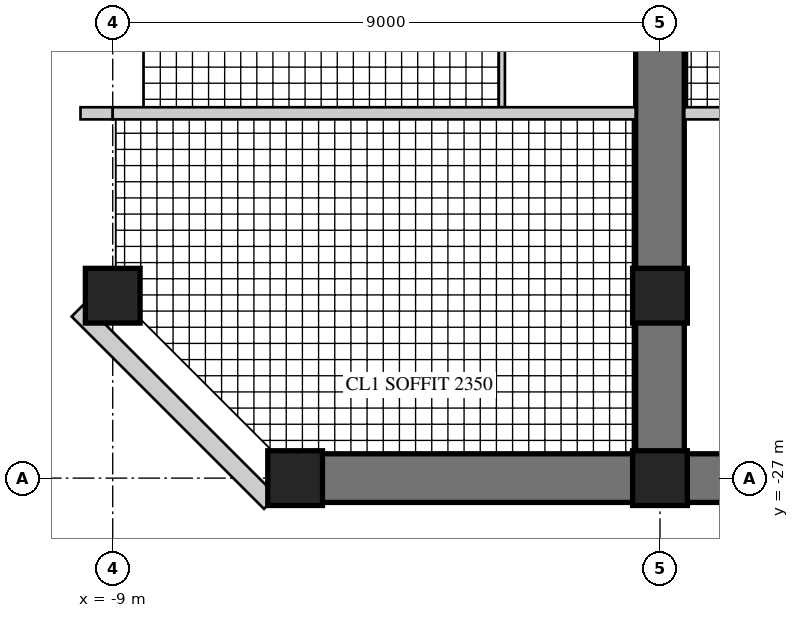
"""IFC4 building model, lengths in metres.
Left out: names, types, materials, properties, quantities, classifications, styles, units other than length and angle.
Written with IfcOpenShell. Run it as: python <this file> out.ifc"""

import sys

from ifc_helpers import new_model, si_unit, direction, frame, frame_2d, origin, origin_2d, place, context, subcontext, project, spatial, rectangle, hollow_rectangle, extrude, element, fill, save


model = new_model("IFC4")
c1 = context("Model", 3, precision=1e-05, world=origin(), true_north=direction((0.0, 1.0)))
c2 = subcontext(c1, "Body", "Model", "MODEL_VIEW")
j1 = project(units=[si_unit("LENGTHUNIT", "METRE"), si_unit("PLANEANGLEUNIT", "RADIAN")], contexts=[c1])
p1 = place(None, origin())
s1 = spatial("IfcSite", under=j1, at=p1, CompositionType="ELEMENT")
p2 = place(p1, origin())
s2 = spatial("IfcBuilding", under=s1, at=p2, CompositionType="ELEMENT")
p3 = place(p2, frame((0.0, 0.0, 172.9)))
s3 = spatial("IfcBuildingStorey", under=s2, at=p3, CompositionType="ELEMENT", Elevation=172.9)
p4 = place(p3, frame((0.0, -9.0, 0.0), z_axis=(0.0, 0.0, 1.0), x_axis=(0.0, -1.0, 0.0)))
e1 = element("IfcWall", 1, at=p4, inside=s3, PredefinedType="SHEAR", context=c2, shape_type="SweptSolid", body=[
    extrude(rectangle(XDim=18.0, YDim=0.8, at=frame_2d((9.0, 0.0))), origin(), (0.0, 0.0, 1.0), 3.4),
])
p5 = place(p4, frame((3.95, 0.0, 0.0)))
e2 = element("IfcOpeningElement", 2, at=p5, cuts=e1, PredefinedType="OPENING", context=c2, shape_type="SweptSolid", body=[
    extrude(rectangle(XDim=1.0, YDim=2.15, at=frame_2d((0.5, 1.075))), frame((0.0, 0.41, 0.0), z_axis=(0.0, -1.0, 0.0), x_axis=(1.0, 0.0, 0.0)), (0.0, 0.0, 1.0), 0.82),
])
p6 = place(p4, frame((6.6, 0.0, 0.0)))
e3 = element("IfcOpeningElement", 3, at=p6, cuts=e1, PredefinedType="OPENING", context=c2, shape_type="SweptSolid", body=[
    extrude(rectangle(XDim=1.0, YDim=2.15, at=frame_2d((0.5, 1.075))), frame((0.0, 0.41, 0.0), z_axis=(0.0, -1.0, 0.0), x_axis=(1.0, 0.0, 0.0)), (0.0, 0.0, 1.0), 0.82),
])
p7 = place(p4, frame((13.25, 0.0, 0.0)))
e4 = element("IfcOpeningElement", 4, at=p7, cuts=e1, PredefinedType="OPENING", context=c2, shape_type="SweptSolid", body=[
    extrude(rectangle(XDim=1.0, YDim=2.2, at=frame_2d((0.5, 1.1))), frame((0.0, 0.41, 0.0), z_axis=(0.0, -1.0, 0.0), x_axis=(1.0, 0.0, 0.0)), (0.0, 0.0, 1.0), 0.82),
])
p8 = place(p3, frame((-6.0, -27.0, 0.0), z_axis=(0.0, 0.0, 1.0), x_axis=(1.0, 0.0, 0.0)))
e5 = element("IfcWall", 5, at=p8, inside=s3, PredefinedType="SHEAR", context=c2, shape_type="SweptSolid", body=[
    extrude(rectangle(XDim=12.0, YDim=0.8, at=frame_2d((6.0, 0.0))), origin(), (0.0, 0.0, 1.0), 3.4),
])
p9 = place(p8, frame((1.625, 0.0, 0.6)))
e6 = element("IfcOpeningElement", 6, at=p9, cuts=e5, PredefinedType="OPENING", context=c2, shape_type="SweptSolid", body=[
    extrude(rectangle(XDim=3.0, YDim=2.4, at=frame_2d((1.5, 1.2))), frame((0.0, 0.41, 0.0), z_axis=(0.0, -1.0, 0.0), x_axis=(1.0, 0.0, 0.0)), (0.0, 0.0, 1.0), 0.82),
])
p10 = place(p8, frame((7.375, 0.0, 0.6)))
e7 = element("IfcOpeningElement", 7, at=p10, cuts=e5, PredefinedType="OPENING", context=c2, shape_type="SweptSolid", body=[
    extrude(rectangle(XDim=3.0, YDim=2.4, at=frame_2d((1.5, 1.2))), frame((0.0, 0.41, 0.0), z_axis=(0.0, -1.0, 0.0), x_axis=(1.0, 0.0, 0.0)), (0.0, 0.0, 1.0), 0.82),
])
for number, where, z_axis, x_axis in (
    (8, (-9.0, -24.0, 0.0), (0.0, 0.0, 1.0), (1.0, 0.0, 0.0)),
    (9, (-6.0, -27.0, 0.0), (0.0, 0.0, 1.0), (1.0, 0.0, 0.0)),
    (10, (0.0, -27.0, 0.0), (0.0, 0.0, 1.0), (1.0, 0.0, 0.0)),
    (11, (0.0, -24.0, 0.0), (0.0, 0.0, 1.0), (1.0, 0.0, 0.0)),
):
    element("IfcColumn", number, at=place(p3, frame(where, z_axis=z_axis, x_axis=x_axis)), inside=s3, PredefinedType="COLUMN", context=c2, shape_type="SweptSolid", body=[
        extrude(rectangle(XDim=0.9, YDim=0.9, at=origin_2d()), origin(), (0.0, 0.0, 1.0), 3.4),
    ])
p11 = place(p3, frame((-9.57, -24.236, 0.0), z_axis=(0.0, 0.0, 1.0), x_axis=(0.707134062067, -0.707079499254, 0.0)))
e12 = element("IfcWall", 12, at=p11, inside=s3, PredefinedType="SOLIDWALL", context=c2, shape_type="SweptSolid", body=[
    extrude(rectangle(XDim=4.475, YDim=0.3, at=frame_2d((2.237, 0.0))), origin(), (0.0, 0.0, 1.0), 3.22),
])
p12 = place(p11, frame((1.787, 0.0, 0.3)))
e13 = element("IfcOpeningElement", 13, at=p12, cuts=e12, PredefinedType="OPENING", context=c2, shape_type="SweptSolid", body=[
    extrude(rectangle(XDim=0.9, YDim=2.4, at=frame_2d((0.45, 1.2))), frame((0.0, 0.16, 0.0), z_axis=(0.0, -1.0, 0.0), x_axis=(1.0, 0.0, 0.0)), (0.0, 0.0, 1.0), 0.32),
])
p13 = place(p3, frame((-2.6, -18.45, 0.0), z_axis=(0.0, 0.0, 1.0), x_axis=(0.0, -1.0, 0.0)))
e14 = element("IfcWall", 14, at=p13, inside=s3, PredefinedType="PARTITIONING", context=c2, shape_type="SweptSolid", body=[
    extrude(rectangle(XDim=2.45, YDim=0.1, at=frame_2d((1.225, 0.0))), origin(), (0.0, 0.0, 1.0), 3.22),
])
p14 = place(p3, frame((-9.53, -21.0, 0.0), z_axis=(0.0, 0.0, 1.0), x_axis=(1.0, 0.0, 0.0)))
e15 = element("IfcWall", 15, at=p14, inside=s3, PredefinedType="SOLIDWALL", context=c2, shape_type="SweptSolid", body=[
    extrude(rectangle(XDim=0.53, YDim=0.2, at=frame_2d((0.265, 0.0))), origin(), (0.0, 0.0, 1.0), 3.22),
])
p15 = place(p3, frame((-9.0, -21.0, 0.0), z_axis=(0.0, 0.0, 1.0), x_axis=(1.0, 0.0, 0.0)))
e16 = element("IfcWall", 16, at=p15, inside=s3, PredefinedType="SOLIDWALL", context=c2, shape_type="SweptSolid", body=[
    extrude(rectangle(XDim=8.6, YDim=0.2, at=frame_2d((4.3, 0.0))), origin(), (0.0, 0.0, 1.0), 2.62),
])
p16 = place(p3, frame((0.4, -21.0, 0.0), z_axis=(0.0, 0.0, 1.0), x_axis=(1.0, 0.0, 0.0)))
e17 = element("IfcWall", 17, at=p16, inside=s3, PredefinedType="SOLIDWALL", context=c2, shape_type="SweptSolid", body=[
    extrude(rectangle(XDim=8.6, YDim=0.2, at=frame_2d((4.3, 0.0))), origin(), (0.0, 0.0, 1.0), 2.62),
])
p17 = place(p16, frame((0.4, 0.0, 0.0)))
e18 = element("IfcOpeningElement", 18, at=p17, cuts=e17, PredefinedType="OPENING", context=c2, shape_type="SweptSolid", body=[
    extrude(rectangle(XDim=1.0, YDim=2.2, at=frame_2d((0.5, 1.1))), frame((0.0, 0.11, 0.0), z_axis=(0.0, -1.0, 0.0), x_axis=(1.0, 0.0, 0.0)), (0.0, 0.0, 1.0), 0.22),
])
p18 = place(p12, origin())
e19 = element("IfcWindow", 19, at=p18, inside=s3, PartitioningType="SINGLE_PANEL", PredefinedType="WINDOW", context=c2, shape_type="SweptSolid", body=[
    extrude(hollow_rectangle(XDim=0.9, YDim=2.4, WallThickness=0.06, at=frame_2d((0.45, 1.2))), frame((0.0, 0.03, 0.0), z_axis=(0.0, -1.0, 0.0), x_axis=(1.0, 0.0, 0.0)), (0.0, 0.0, 1.0), 0.06),
    extrude(rectangle(XDim=0.779, YDim=2.279, at=frame_2d((0.45, 1.2))), frame((0.0, 0.03, 0.0), z_axis=(0.0, -1.0, 0.0), x_axis=(1.0, 0.0, 0.0)), (0.0, 0.0, 1.0), 0.06),
])
fill(e13, e19)
p19 = place(p9, origin())
e20 = element("IfcWindow", 20, at=p19, inside=s3, PartitioningType="SINGLE_PANEL", PredefinedType="WINDOW", context=c2, shape_type="SweptSolid", body=[
    extrude(hollow_rectangle(XDim=3.0, YDim=2.4, WallThickness=0.06, at=frame_2d((1.5, 1.2))), frame((0.0, 0.03, 0.0), z_axis=(0.0, -1.0, 0.0), x_axis=(1.0, 0.0, 0.0)), (0.0, 0.0, 1.0), 0.06),
    extrude(rectangle(XDim=2.879, YDim=2.279, at=frame_2d((1.5, 1.2))), frame((0.0, 0.03, 0.0), z_axis=(0.0, -1.0, 0.0), x_axis=(1.0, 0.0, 0.0)), (0.0, 0.0, 1.0), 0.06),
])
fill(e6, e20)
p20 = place(p17, frame((1.0, 0.0, 0.0), z_axis=(0.0, 0.0, 1.0), x_axis=(-1.0, 0.0, 0.0)))
e21 = element("IfcDoor", 21, at=p20, inside=s3, OperationType="SINGLE_SWING_RIGHT", PredefinedType="DOOR", context=c2, shape_type="SweptSolid", body=[
    extrude(rectangle(XDim=1.0, YDim=2.2, at=frame_2d((0.5, 1.1))), frame((0.0, 0.025, 0.0), z_axis=(0.0, -1.0, 0.0), x_axis=(1.0, 0.0, 0.0)), (0.0, 0.0, 1.0), 0.05),
])
fill(e18, e21)
p21 = place(p7, origin())
e22 = element("IfcDoor", 22, at=p21, inside=s3, OperationType="SINGLE_SWING_LEFT", PredefinedType="DOOR", context=c2, shape_type="SweptSolid", body=[
    extrude(rectangle(XDim=1.0, YDim=2.2, at=frame_2d((0.5, 1.1))), frame((0.0, 0.025, 0.0), z_axis=(0.0, -1.0, 0.0), x_axis=(1.0, 0.0, 0.0)), (0.0, 0.0, 1.0), 0.05),
])
fill(e4, e22)
save(model, sys.argv[1])
